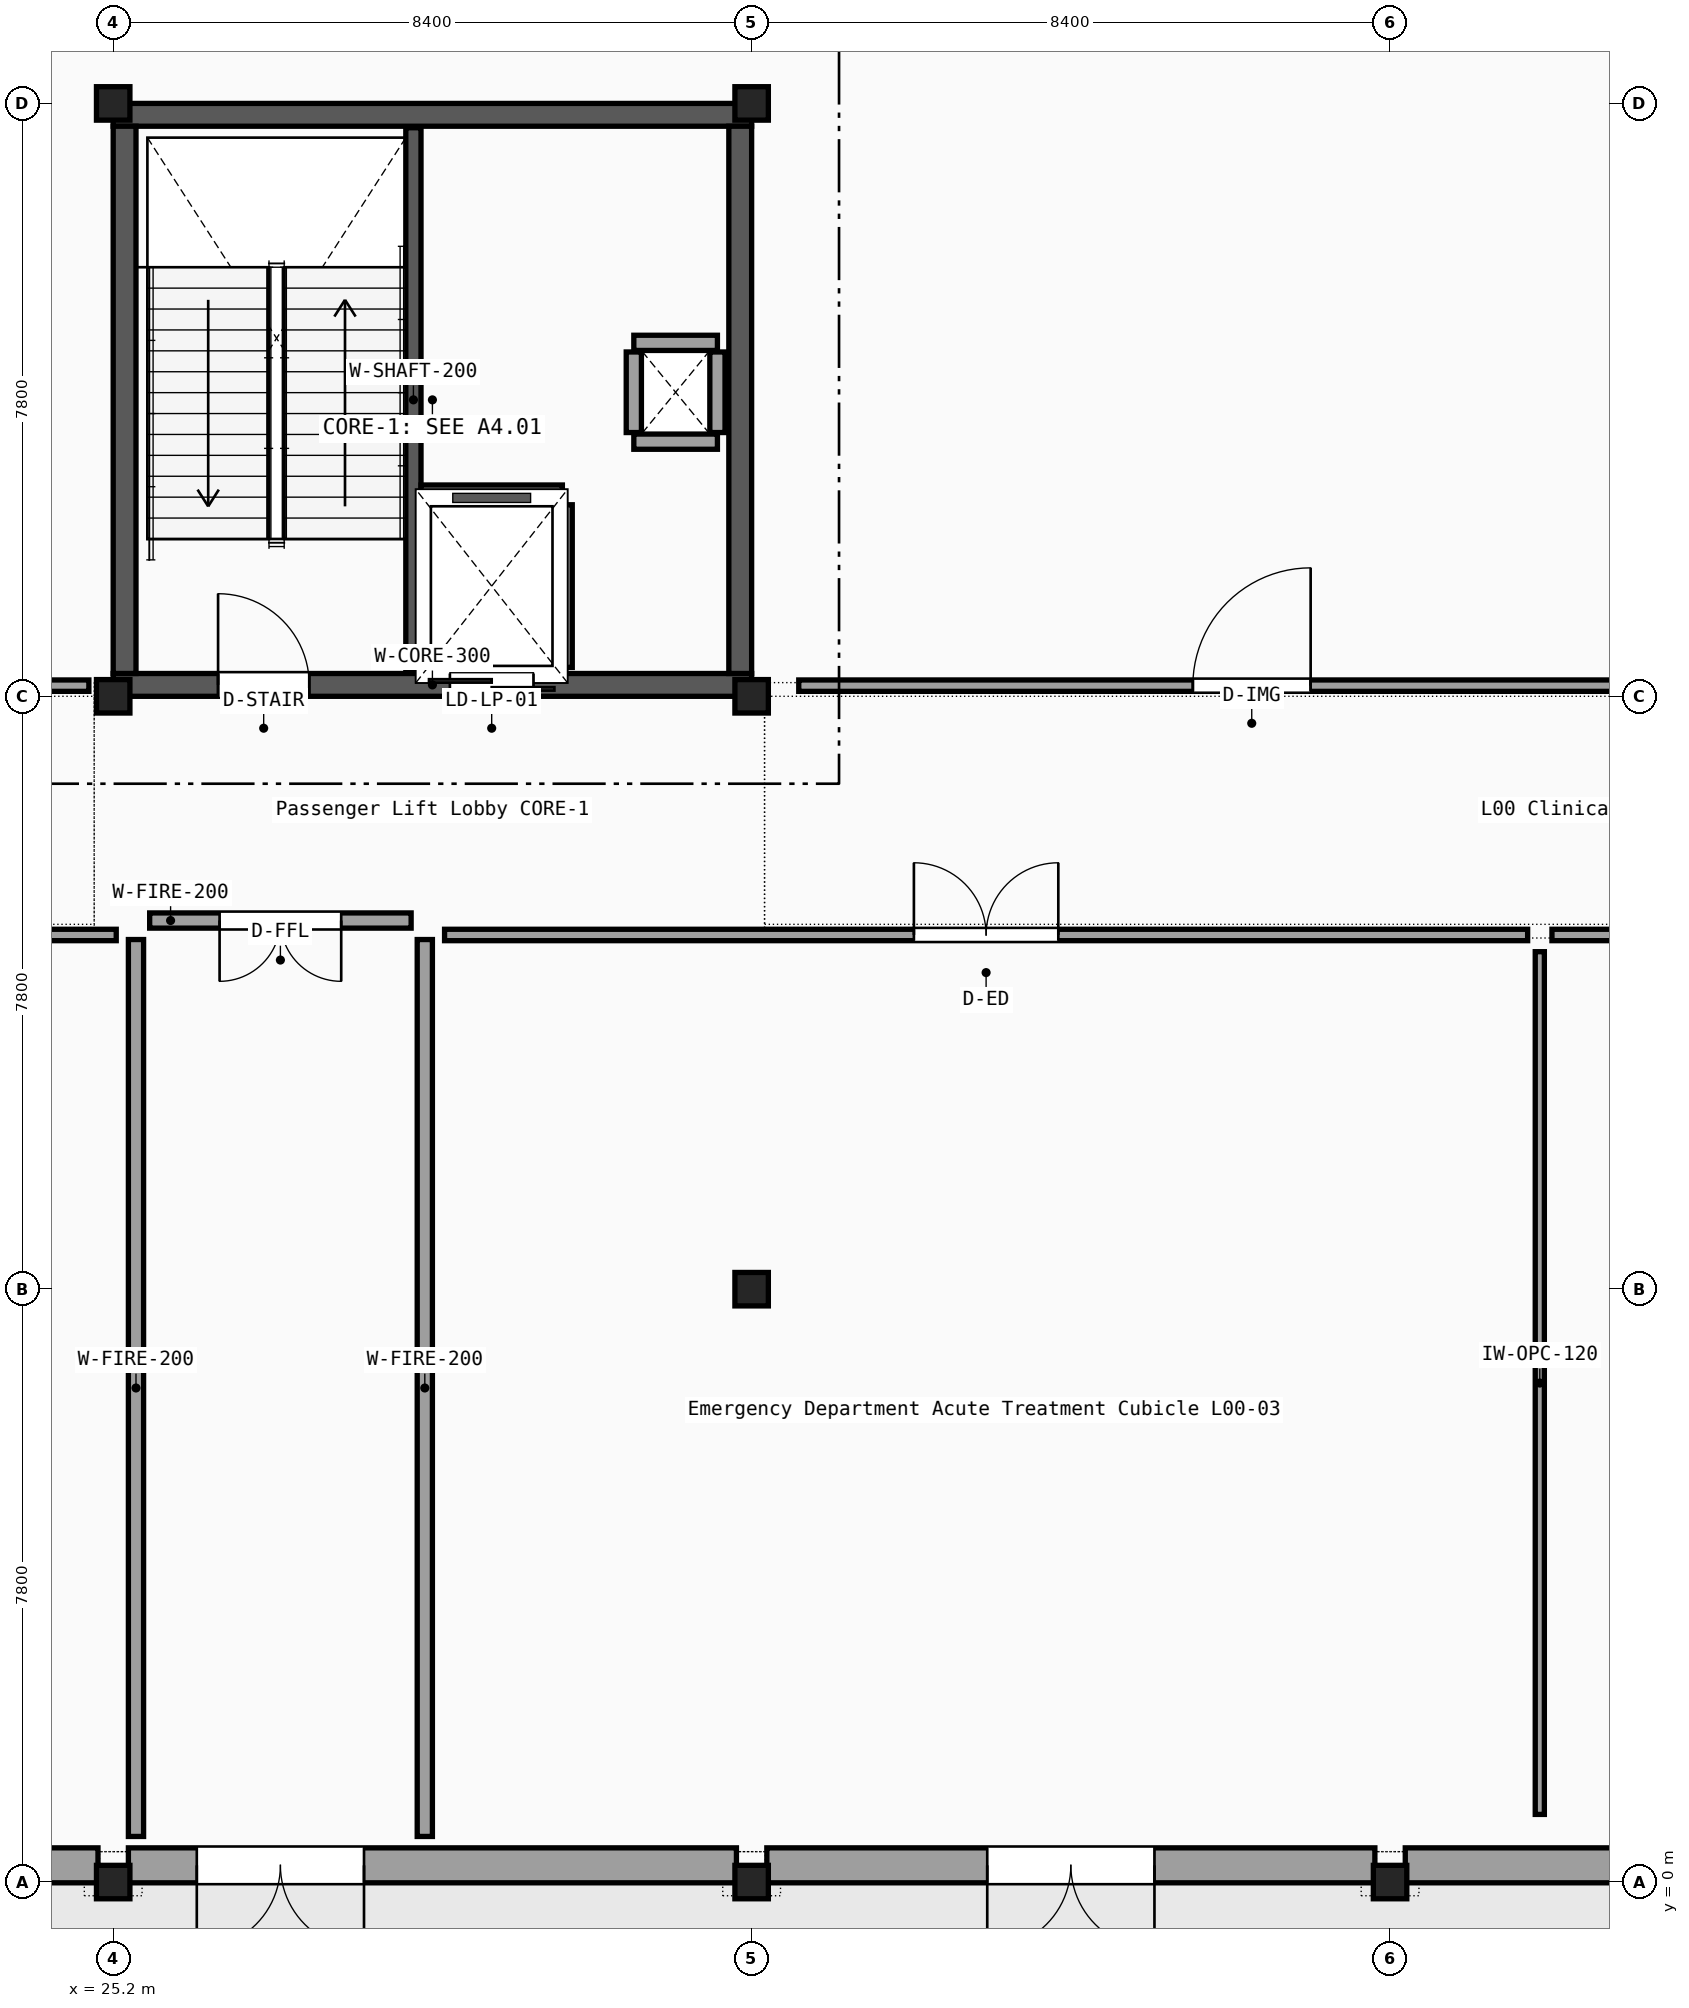
"""IFC4 building model, lengths in metres.
Left out: names, types, materials, properties, quantities, classifications, styles, units other than length and angle.
Written with IfcOpenShell. Run it as: python <this file> out.ifc"""

import sys

from ifc_helpers import new_model, si_unit, direction, frame, frame_2d, origin, origin_2d, place, context, subcontext, project, spatial, rectangle, i_section, extrude, element, fill, save


model = new_model("IFC4")
c1 = context("Model", 3, precision=1e-05, world=origin(), true_north=direction((0.0, 1.0)))
c2 = subcontext(c1, "Body", "Model", "MODEL_VIEW")
j1 = project(units=[si_unit("LENGTHUNIT", "METRE"), si_unit("PLANEANGLEUNIT", "RADIAN")], contexts=[c1])
p1 = place(None, origin())
s1 = spatial("IfcSite", under=j1, at=p1, CompositionType="ELEMENT")
p2 = place(p1, origin())
s2 = spatial("IfcBuilding", under=s1, at=p2, CompositionType="ELEMENT")
p3 = place(p2, origin())
s3 = spatial("IfcBuildingStorey", under=s2, at=p3, CompositionType="ELEMENT", Elevation=0.0)
for number, where, z_axis, x_axis in (
    (1, (25.2, 0.0, 0.0), (0.0, 0.0, 1.0), (1.0, 0.0, 0.0)),
    (2, (25.2, 15.6, 0.0), (0.0, 0.0, 1.0), (1.0, 0.0, 0.0)),
    (3, (25.2, 23.4, 0.0), (0.0, 0.0, 1.0), (1.0, 0.0, 0.0)),
    (4, (33.6, 0.0, 0.0), (0.0, 0.0, 1.0), (1.0, 0.0, 0.0)),
    (5, (33.6, 7.8, 0.0), (0.0, 0.0, 1.0), (1.0, 0.0, 0.0)),
    (6, (33.6, 15.6, 0.0), (0.0, 0.0, 1.0), (1.0, 0.0, 0.0)),
    (7, (33.6, 23.4, 0.0), (0.0, 0.0, 1.0), (1.0, 0.0, 0.0)),
    (8, (42.0, 0.0, 0.0), (0.0, 0.0, 1.0), (1.0, 0.0, 0.0)),
):
    element("IfcColumn", number, at=place(p3, frame(where, z_axis=z_axis, x_axis=x_axis)), inside=s3, PredefinedType="COLUMN", context=c2, shape_type="SweptSolid", body=[
        extrude(i_section(OverallWidth=0.3, OverallDepth=0.44, WebThickness=0.011, FlangeThickness=0.021, FilletRadius=0.027, at=origin_2d()), origin(), (0.0, 0.0, 1.0), 5.1),
    ])
p4 = place(p3, frame((17.0, 0.22, 0.0), z_axis=(0.0, 0.0, 1.0), x_axis=(1.0, 0.0, 0.0)))
e9 = element("IfcWall", 9, at=p4, inside=s3, PredefinedType="SOLIDWALL", context=c2, shape_type="SweptSolid", body=[
    extrude(rectangle(XDim=8.0, YDim=0.46, at=frame_2d((4.0, 0.0))), origin(), (0.0, 0.0, 1.0), 4.43),
])
p5 = place(p4, frame((2.9, 0.0, 0.0)))
e10 = element("IfcOpeningElement", 10, at=p5, cuts=e9, PredefinedType="OPENING", context=c2, shape_type="SweptSolid", body=[
    extrude(rectangle(XDim=2.2, YDim=2.3, at=frame_2d((1.1, 1.15))), frame((0.0, 0.24, 0.0), z_axis=(0.0, -1.0, 0.0), x_axis=(1.0, 0.0, 0.0)), (0.0, 0.0, 1.0), 0.48),
])
p6 = place(p3, frame((25.4, 0.22, 0.0), z_axis=(0.0, 0.0, 1.0), x_axis=(1.0, 0.0, 0.0)))
e11 = element("IfcWall", 11, at=p6, inside=s3, PredefinedType="SOLIDWALL", context=c2, shape_type="SweptSolid", body=[
    extrude(rectangle(XDim=8.0, YDim=0.46, at=frame_2d((4.0, 0.0))), origin(), (0.0, 0.0, 1.0), 4.43),
])
p7 = place(p6, frame((0.9, 0.0, 0.0)))
e12 = element("IfcOpeningElement", 12, at=p7, cuts=e11, PredefinedType="OPENING", context=c2, shape_type="SweptSolid", body=[
    extrude(rectangle(XDim=2.2, YDim=2.3, at=frame_2d((1.1, 1.15))), frame((0.0, 0.24, 0.0), z_axis=(0.0, -1.0, 0.0), x_axis=(1.0, 0.0, 0.0)), (0.0, 0.0, 1.0), 0.48),
])
p8 = place(p3, frame((33.8, 0.22, 0.0), z_axis=(0.0, 0.0, 1.0), x_axis=(1.0, 0.0, 0.0)))
e13 = element("IfcWall", 13, at=p8, inside=s3, PredefinedType="SOLIDWALL", context=c2, shape_type="SweptSolid", body=[
    extrude(rectangle(XDim=8.0, YDim=0.46, at=frame_2d((4.0, 0.0))), origin(), (0.0, 0.0, 1.0), 4.43),
])
p9 = place(p8, frame((2.9, 0.0, 0.0)))
e14 = element("IfcOpeningElement", 14, at=p9, cuts=e13, PredefinedType="OPENING", context=c2, shape_type="SweptSolid", body=[
    extrude(rectangle(XDim=2.2, YDim=2.3, at=frame_2d((1.1, 1.15))), frame((0.0, 0.24, 0.0), z_axis=(0.0, -1.0, 0.0), x_axis=(1.0, 0.0, 0.0)), (0.0, 0.0, 1.0), 0.48),
])
p10 = place(p3, frame((42.2, 0.22, 0.0), z_axis=(0.0, 0.0, 1.0), x_axis=(1.0, 0.0, 0.0)))
e15 = element("IfcWall", 15, at=p10, inside=s3, PredefinedType="SOLIDWALL", context=c2, shape_type="SweptSolid", body=[
    extrude(rectangle(XDim=8.0, YDim=0.46, at=frame_2d((4.0, 0.0))), origin(), (0.0, 0.0, 1.0), 4.44),
])
p11 = place(p10, frame((3.275, 0.0, 0.85)))
e16 = element("IfcOpeningElement", 16, at=p11, cuts=e15, PredefinedType="OPENING", context=c2, shape_type="SweptSolid", body=[
    extrude(rectangle(XDim=1.45, YDim=1.65, at=frame_2d((0.725, 0.825))), frame((0.0, 0.24, 0.0), z_axis=(0.0, -1.0, 0.0), x_axis=(1.0, 0.0, 0.0)), (0.0, 0.0, 1.0), 0.48),
])
p12 = place(p3, frame((25.2, 15.75, 0.0), z_axis=(0.0, 0.0, 1.0), x_axis=(1.0, 0.0, 0.0)))
e17 = element("IfcWall", 17, at=p12, inside=s3, PredefinedType="SHEAR", context=c2, shape_type="SweptSolid", body=[
    extrude(rectangle(XDim=8.4, YDim=0.3, at=frame_2d((4.2, 0.0))), origin(), (0.0, 0.0, 1.0), 4.85),
])
p13 = place(p12, frame((1.38, 0.0, 0.0)))
e18 = element("IfcOpeningElement", 18, at=p13, cuts=e17, PredefinedType="OPENING", context=c2, shape_type="SweptSolid", body=[
    extrude(rectangle(XDim=1.2, YDim=2.15, at=frame_2d((0.6, 1.075))), frame((0.0, 0.16, 0.0), z_axis=(0.0, -1.0, 0.0), x_axis=(1.0, 0.0, 0.0)), (0.0, 0.0, 1.0), 0.32),
])
p14 = place(p12, frame((4.43, 0.0, 0.0)))
e19 = element("IfcOpeningElement", 19, at=p14, cuts=e17, PredefinedType="OPENING", context=c2, shape_type="SweptSolid", body=[
    extrude(rectangle(XDim=1.1, YDim=2.15, at=frame_2d((0.55, 1.075))), frame((0.0, 0.16, 0.0), z_axis=(0.0, -1.0, 0.0), x_axis=(1.0, 0.0, 0.0)), (0.0, 0.0, 1.0), 0.32),
])
p15 = place(p3, frame((25.2, 23.25, 0.0), z_axis=(0.0, 0.0, 1.0), x_axis=(1.0, 0.0, 0.0)))
e20 = element("IfcWall", 20, at=p15, inside=s3, PredefinedType="SHEAR", context=c2, shape_type="SweptSolid", body=[
    extrude(rectangle(XDim=8.4, YDim=0.3, at=frame_2d((4.2, 0.0))), origin(), (0.0, 0.0, 1.0), 4.85),
])
for number, where, z_axis, x_axis in (
    (21, (25.35, 15.9, 0.0), (0.0, 0.0, 1.0), (0.0, 1.0, 0.0)),
    (22, (33.45, 15.9, 0.0), (0.0, 0.0, 1.0), (0.0, 1.0, 0.0)),
):
    element("IfcWall", number, at=place(p3, frame(where, z_axis=z_axis, x_axis=x_axis)), inside=s3, PredefinedType="SHEAR", context=c2, shape_type="SweptSolid", body=[
        extrude(rectangle(XDim=7.2, YDim=0.3, at=frame_2d((3.6, 0.0))), origin(), (0.0, 0.0, 1.0), 4.85),
    ])
p16 = place(p3, frame((29.15, 15.92, 0.0), z_axis=(0.0, 0.0, 1.0), x_axis=(0.0, 1.0, 0.0)))
e23 = element("IfcWall", 23, at=p16, inside=s3, PredefinedType="SHEAR", context=c2, shape_type="SweptSolid", body=[
    extrude(rectangle(XDim=7.16, YDim=0.2, at=frame_2d((3.58, 0.0))), origin(), (0.0, 0.0, 1.0), 4.85),
])
for number, where, z_axis, x_axis in (
    (24, (32.05, 18.95, 0.0), (0.0, 0.0, 1.0), (1.0, 0.0, 0.0)),
    (25, (32.05, 20.25, 0.0), (0.0, 0.0, 1.0), (1.0, 0.0, 0.0)),
):
    element("IfcWall", number, at=place(p3, frame(where, z_axis=z_axis, x_axis=x_axis)), inside=s3, PredefinedType="PARTITIONING", context=c2, shape_type="SweptSolid", body=[
        extrude(rectangle(XDim=1.1, YDim=0.2, at=frame_2d((0.55, 0.0))), origin(), (0.0, 0.0, 1.0), 4.23),
    ])
for number, where, z_axis, x_axis in (
    (26, (32.05, 19.07, 0.0), (0.0, 0.0, 1.0), (0.0, 1.0, 0.0)),
    (27, (33.15, 19.07, 0.0), (0.0, 0.0, 1.0), (0.0, 1.0, 0.0)),
):
    element("IfcWall", number, at=place(p3, frame(where, z_axis=z_axis, x_axis=x_axis)), inside=s3, PredefinedType="PARTITIONING", context=c2, shape_type="SweptSolid", body=[
        extrude(rectangle(XDim=1.06, YDim=0.2, at=frame_2d((0.53, 0.0))), origin(), (0.0, 0.0, 1.0), 4.23),
    ])
p17 = place(p3, frame((31.14, 15.98, 0.0), z_axis=(0.0, 0.0, 1.0), x_axis=(0.0, 1.0, 0.0)))
e28 = element("IfcWall", 28, at=p17, inside=s3, PredefinedType="PARTITIONING", context=c2, shape_type="SweptSolid", body=[
    extrude(rectangle(XDim=2.14, YDim=0.2, at=frame_2d((1.07, 0.0))), origin(), (0.0, 0.0, 1.0), 4.23),
])
p18 = place(p3, frame((29.25, 18.28, 0.0), z_axis=(0.0, 0.0, 1.0), x_axis=(1.0, 0.0, 0.0)))
e29 = element("IfcWall", 29, at=p18, inside=s3, PredefinedType="PARTITIONING", context=c2, shape_type="SweptSolid", body=[
    extrude(rectangle(XDim=1.86, YDim=0.2, at=frame_2d((0.93, 0.0))), origin(), (0.0, 0.0, 1.0), 4.23),
])
for number, where, z_axis, x_axis in (
    (30, (25.5, 0.6, 0.0), (0.0, 0.0, 1.0), (0.0, 1.0, 0.0)),
    (31, (29.3, 0.6, 0.0), (0.0, 0.0, 1.0), (0.0, 1.0, 0.0)),
):
    element("IfcWall", number, at=place(p3, frame(where, z_axis=z_axis, x_axis=x_axis)), inside=s3, PredefinedType="PARTITIONING", context=c2, shape_type="SweptSolid", body=[
        extrude(rectangle(XDim=11.8, YDim=0.2, at=frame_2d((5.9, 0.0))), origin(), (0.0, 0.0, 1.0), 4.33),
    ])
p19 = place(p3, frame((25.68, 12.65, 0.0), z_axis=(0.0, 0.0, 1.0), x_axis=(1.0, 0.0, 0.0)))
e32 = element("IfcWall", 32, at=p19, inside=s3, PredefinedType="PARTITIONING", context=c2, shape_type="SweptSolid", body=[
    extrude(rectangle(XDim=3.44, YDim=0.2, at=frame_2d((1.72, 0.0))), origin(), (0.0, 0.0, 1.0), 4.82),
])
p20 = place(p19, frame((0.92, 0.0, 0.0)))
e33 = element("IfcOpeningElement", 33, at=p20, cuts=e32, PredefinedType="OPENING", context=c2, shape_type="SweptSolid", body=[
    extrude(rectangle(XDim=1.6, YDim=2.2, at=frame_2d((0.8, 1.1))), frame((0.0, 0.11, 0.0), z_axis=(0.0, -1.0, 0.0), x_axis=(1.0, 0.0, 0.0)), (0.0, 0.0, 1.0), 0.22),
])
p21 = place(p3, frame((13.09, 12.46, 0.0), z_axis=(0.0, 0.0, 1.0), x_axis=(1.0, 0.0, 0.0)))
e34 = element("IfcWall", 34, at=p21, inside=s3, PredefinedType="PARTITIONING", context=c2, shape_type="SweptSolid", body=[
    extrude(rectangle(XDim=12.15, YDim=0.15, at=frame_2d((6.075, 0.0))), origin(), (0.0, 0.0, 1.0), 4.43),
])
p22 = place(p21, frame((5.125, 0.0, 0.0)))
e35 = element("IfcOpeningElement", 35, at=p22, cuts=e34, PredefinedType="OPENING", context=c2, shape_type="SweptSolid", body=[
    extrude(rectangle(XDim=1.9, YDim=2.35, at=frame_2d((0.95, 1.175))), frame((0.0, 0.085, 0.0), z_axis=(0.0, -1.0, 0.0), x_axis=(1.0, 0.0, 0.0)), (0.0, 0.0, 1.0), 0.17),
])
p23 = place(p3, frame((29.56, 12.46, 0.0), z_axis=(0.0, 0.0, 1.0), x_axis=(1.0, 0.0, 0.0)))
e36 = element("IfcWall", 36, at=p23, inside=s3, PredefinedType="PARTITIONING", context=c2, shape_type="SweptSolid", body=[
    extrude(rectangle(XDim=14.25, YDim=0.15, at=frame_2d((7.125, 0.0))), origin(), (0.0, 0.0, 1.0), 4.43),
])
p24 = place(p23, frame((6.175, 0.0, 0.0)))
e37 = element("IfcOpeningElement", 37, at=p24, cuts=e36, PredefinedType="OPENING", context=c2, shape_type="SweptSolid", body=[
    extrude(rectangle(XDim=1.9, YDim=2.35, at=frame_2d((0.95, 1.175))), frame((0.0, 0.085, 0.0), z_axis=(0.0, -1.0, 0.0), x_axis=(1.0, 0.0, 0.0)), (0.0, 0.0, 1.0), 0.17),
])
p25 = place(p3, frame((43.97, 0.89, 0.0), z_axis=(0.0, 0.0, 1.0), x_axis=(0.0, 1.0, 0.0)))
e38 = element("IfcWall", 38, at=p25, inside=s3, PredefinedType="PARTITIONING", context=c2, shape_type="SweptSolid", body=[
    extrude(rectangle(XDim=11.35, YDim=0.12, at=frame_2d((5.675, 0.0))), origin(), (0.0, 0.0, 1.0), 4.82),
])
p26 = place(p3, frame((44.13, 12.46, 0.0), z_axis=(0.0, 0.0, 1.0), x_axis=(1.0, 0.0, 0.0)))
e39 = element("IfcWall", 39, at=p26, inside=s3, PredefinedType="PARTITIONING", context=c2, shape_type="SweptSolid", body=[
    extrude(rectangle(XDim=14.25, YDim=0.15, at=frame_2d((7.125, 0.0))), origin(), (0.0, 0.0, 1.0), 4.82),
])
p27 = place(p26, frame((6.175, 0.0, 0.0)))
e40 = element("IfcOpeningElement", 40, at=p27, cuts=e39, PredefinedType="OPENING", context=c2, shape_type="SweptSolid", body=[
    extrude(rectangle(XDim=1.9, YDim=2.35, at=frame_2d((0.95, 1.175))), frame((0.0, 0.085, 0.0), z_axis=(0.0, -1.0, 0.0), x_axis=(1.0, 0.0, 0.0)), (0.0, 0.0, 1.0), 0.17),
])
p28 = place(p3, frame((12.91, 15.74, 0.0), z_axis=(0.0, 0.0, 1.0), x_axis=(1.0, 0.0, 0.0)))
e41 = element("IfcWall", 41, at=p28, inside=s3, PredefinedType="PARTITIONING", context=c2, shape_type="SweptSolid", body=[
    extrude(rectangle(XDim=11.97, YDim=0.15, at=frame_2d((5.985, 0.0))), origin(), (0.0, 0.0, 1.0), 4.33),
])
p29 = place(p28, frame((5.035, 0.0, 0.0)))
e42 = element("IfcOpeningElement", 42, at=p29, cuts=e41, PredefinedType="OPENING", context=c2, shape_type="SweptSolid", body=[
    extrude(rectangle(XDim=1.9, YDim=2.35, at=frame_2d((0.95, 1.175))), frame((0.0, 0.085, 0.0), z_axis=(0.0, -1.0, 0.0), x_axis=(1.0, 0.0, 0.0)), (0.0, 0.0, 1.0), 0.17),
])
p30 = place(p3, frame((34.22, 15.74, 0.0), z_axis=(0.0, 0.0, 1.0), x_axis=(1.0, 0.0, 0.0)))
e43 = element("IfcWall", 43, at=p30, inside=s3, PredefinedType="PARTITIONING", context=c2, shape_type="SweptSolid", body=[
    extrude(rectangle(XDim=11.92, YDim=0.15, at=frame_2d((5.96, 0.0))), origin(), (0.0, 0.0, 1.0), 4.82),
])
p31 = place(p30, frame((5.185, 0.0, 0.0)))
e44 = element("IfcOpeningElement", 44, at=p31, cuts=e43, PredefinedType="OPENING", context=c2, shape_type="SweptSolid", body=[
    extrude(rectangle(XDim=1.55, YDim=2.25, at=frame_2d((0.775, 1.125))), frame((0.0, 0.085, 0.0), z_axis=(0.0, -1.0, 0.0), x_axis=(1.0, 0.0, 0.0)), (0.0, 0.0, 1.0), 0.17),
])
p32 = place(p7, frame((2.2, 0.0, 0.0), z_axis=(0.0, 0.0, 1.0), x_axis=(-1.0, 0.0, 0.0)))
e45 = element("IfcDoor", 45, at=p32, inside=s3, OperationType="DOUBLE_DOOR_SINGLE_SWING", PredefinedType="DOOR", context=c2, shape_type="SweptSolid", body=[
    extrude(rectangle(XDim=2.2, YDim=2.3, at=frame_2d((1.1, 1.15))), frame((0.0, 0.025, 0.0), z_axis=(0.0, -1.0, 0.0), x_axis=(1.0, 0.0, 0.0)), (0.0, 0.0, 1.0), 0.05),
])
fill(e12, e45)
p33 = place(p9, frame((2.2, 0.0, 0.0), z_axis=(0.0, 0.0, 1.0), x_axis=(-1.0, 0.0, 0.0)))
e46 = element("IfcDoor", 46, at=p33, inside=s3, OperationType="DOUBLE_DOOR_SINGLE_SWING", PredefinedType="DOOR", context=c2, shape_type="SweptSolid", body=[
    extrude(rectangle(XDim=2.2, YDim=2.3, at=frame_2d((1.1, 1.15))), frame((0.0, 0.025, 0.0), z_axis=(0.0, -1.0, 0.0), x_axis=(1.0, 0.0, 0.0)), (0.0, 0.0, 1.0), 0.05),
])
fill(e14, e46)
p34 = place(p13, origin())
e47 = element("IfcDoor", 47, at=p34, inside=s3, OperationType="SINGLE_SWING_LEFT", PredefinedType="DOOR", context=c2, shape_type="SweptSolid", body=[
    extrude(rectangle(XDim=1.2, YDim=2.15, at=frame_2d((0.6, 1.075))), frame((0.0, 0.025, 0.0), z_axis=(0.0, -1.0, 0.0), x_axis=(1.0, 0.0, 0.0)), (0.0, 0.0, 1.0), 0.05),
])
fill(e18, e47)
p35 = place(p14, origin())
e48 = element("IfcDoor", 48, at=p35, inside=s3, OperationType="DOUBLE_DOOR_SLIDING", PredefinedType="DOOR", context=c2, shape_type="SweptSolid", body=[
    extrude(rectangle(XDim=1.1, YDim=2.15, at=frame_2d((0.55, 1.075))), frame((0.0, 0.025, 0.0), z_axis=(0.0, -1.0, 0.0), x_axis=(1.0, 0.0, 0.0)), (0.0, 0.0, 1.0), 0.05),
])
fill(e19, e48)
p36 = place(p20, frame((1.6, 0.0, 0.0), z_axis=(0.0, 0.0, 1.0), x_axis=(-1.0, 0.0, 0.0)))
e49 = element("IfcDoor", 49, at=p36, inside=s3, OperationType="DOUBLE_DOOR_SINGLE_SWING", PredefinedType="DOOR", context=c2, shape_type="SweptSolid", body=[
    extrude(rectangle(XDim=1.6, YDim=2.2, at=frame_2d((0.8, 1.1))), frame((0.0, 0.025, 0.0), z_axis=(0.0, -1.0, 0.0), x_axis=(1.0, 0.0, 0.0)), (0.0, 0.0, 1.0), 0.05),
])
fill(e33, e49)
p37 = place(p24, origin())
e50 = element("IfcDoor", 50, at=p37, inside=s3, OperationType="DOUBLE_DOOR_SINGLE_SWING", PredefinedType="DOOR", context=c2, shape_type="SweptSolid", body=[
    extrude(rectangle(XDim=1.9, YDim=2.35, at=frame_2d((0.95, 1.175))), frame((0.0, 0.025, 0.0), z_axis=(0.0, -1.0, 0.0), x_axis=(1.0, 0.0, 0.0)), (0.0, 0.0, 1.0), 0.05),
])
fill(e37, e50)
p38 = place(p31, origin())
e51 = element("IfcDoor", 51, at=p38, inside=s3, OperationType="SINGLE_SWING_RIGHT", PredefinedType="DOOR", context=c2, shape_type="SweptSolid", body=[
    extrude(rectangle(XDim=1.55, YDim=2.25, at=frame_2d((0.775, 1.125))), frame((0.0, 0.025, 0.0), z_axis=(0.0, -1.0, 0.0), x_axis=(1.0, 0.0, 0.0)), (0.0, 0.0, 1.0), 0.05),
])
fill(e44, e51)
save(model, sys.argv[1])
